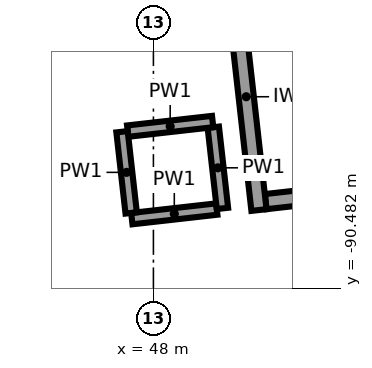
"""IFC4 building model, lengths in metres.
Left out: names, types, materials, properties, quantities, classifications, styles, units other than length and angle.
Written with IfcOpenShell. Run it as: python <this file> out.ifc"""

import sys

from ifc_helpers import new_model, si_unit, direction, frame, frame_2d, origin, place, context, subcontext, project, spatial, rectangle, extrude, element, save


model = new_model("IFC4")
c1 = context("Model", 3, precision=1e-05, world=origin(), true_north=direction((0.0, 1.0)))
c2 = subcontext(c1, "Body", "Model", "MODEL_VIEW")
j1 = project(units=[si_unit("LENGTHUNIT", "METRE"), si_unit("PLANEANGLEUNIT", "RADIAN")], contexts=[c1])
p1 = place(None, origin())
s1 = spatial("IfcSite", under=j1, at=p1, CompositionType="ELEMENT")
p2 = place(p1, origin())
s2 = spatial("IfcBuilding", under=s1, at=p2, CompositionType="ELEMENT")
p3 = place(p2, frame((0.0, 0.0, 12.0)))
s3 = spatial("IfcBuildingStorey", under=s2, at=p3, CompositionType="ELEMENT", Elevation=12.0)
p4 = place(p3, frame((49.389, -89.454, 0.0), z_axis=(0.0, 0.0, 1.0), x_axis=(-0.111976588553, 0.993710845073, 0.0)))
e1 = element("IfcWall", 1, at=p4, inside=s3, PredefinedType="SHEAR", context=c2, shape_type="SweptSolid", body=[
    extrude(rectangle(XDim=3.0, YDim=0.2, at=frame_2d((1.5, 0.0))), origin(), (0.0, 0.0, 1.0), 5.65),
])
p5 = place(p3, frame((49.477, -89.343, 0.0), z_axis=(0.0, 0.0, 1.0), x_axis=(0.993718105662, 0.11191213732, 0.0)))
e2 = element("IfcWall", 2, at=p5, inside=s3, PredefinedType="SHEAR", context=c2, shape_type="SweptSolid", body=[
    extrude(rectangle(XDim=1.9, YDim=0.2, at=frame_2d((0.95, 0.0))), origin(), (0.0, 0.0, 1.0), 5.65),
])
p6 = place(p3, frame((47.716, -89.567, 0.0), z_axis=(0.0, 0.0, 1.0), x_axis=(0.993710504932, 0.11197960702, 0.0)))
e3 = element("IfcWall", 3, at=p6, inside=s3, PredefinedType="PARTITIONING", context=c2, shape_type="SweptSolid", body=[
    extrude(rectangle(XDim=1.125, YDim=0.15, at=frame_2d((0.562, 0.0))), origin(), (0.0, 0.0, 1.0), 5.65),
])
p7 = place(p3, frame((48.908, -89.432, 0.0), z_axis=(0.0, 0.0, 1.0), x_axis=(-0.111951742856, 0.993713644503, 0.0)))
e4 = element("IfcWall", 4, at=p7, inside=s3, PredefinedType="PARTITIONING", context=c2, shape_type="SweptSolid", body=[
    extrude(rectangle(XDim=1.075, YDim=0.15, at=frame_2d((0.538, 0.0))), origin(), (0.0, 0.0, 1.0), 5.65),
])
p8 = place(p3, frame((48.78, -88.29, 0.0), z_axis=(0.0, 0.0, 1.0), x_axis=(-0.993710504932, -0.11197960702, 0.0)))
e5 = element("IfcWall", 5, at=p8, inside=s3, PredefinedType="PARTITIONING", context=c2, shape_type="SweptSolid", body=[
    extrude(rectangle(XDim=1.125, YDim=0.15, at=frame_2d((0.562, 0.0))), origin(), (0.0, 0.0, 1.0), 5.65),
])
p9 = place(p3, frame((47.587, -88.424, 0.0), z_axis=(0.0, 0.0, 1.0), x_axis=(0.111951742856, -0.993713644503, 0.0)))
e6 = element("IfcWall", 6, at=p9, inside=s3, PredefinedType="PARTITIONING", context=c2, shape_type="SweptSolid", body=[
    extrude(rectangle(XDim=1.075, YDim=0.15, at=frame_2d((0.538, 0.0))), origin(), (0.0, 0.0, 1.0), 5.65),
])
save(model, sys.argv[1])
